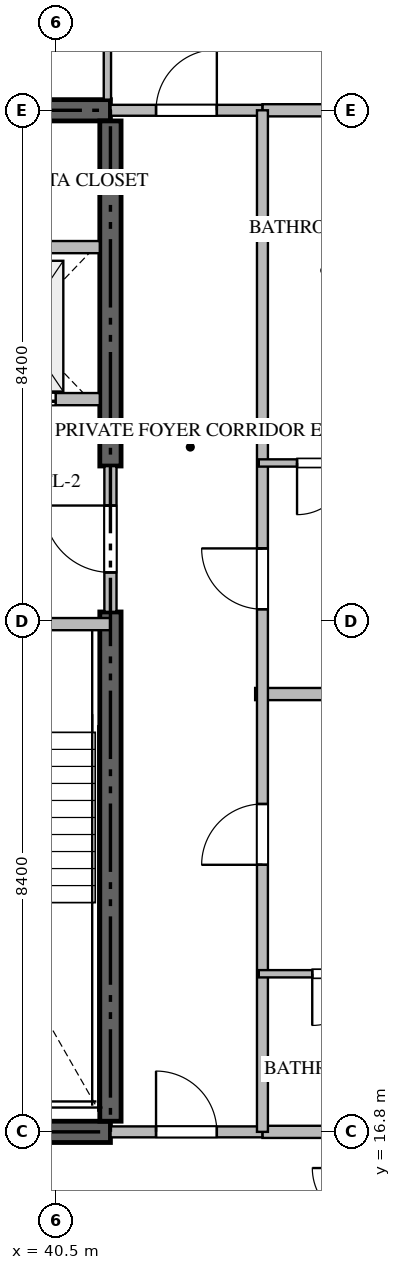
"""IFC4 building model, lengths in metres.
Left out: names, types, materials, properties, quantities, classifications, styles, units other than length and angle.
Written with IfcOpenShell. Run it as: python <this file> out.ifc"""

import sys

from ifc_helpers import new_model, si_unit, direction, frame, frame_2d, origin, place, context, subcontext, project, spatial, rectangle, extrude, source, transform, mapped, element, fill, save


model = new_model("IFC4")
c1 = context("Model", 3, precision=1e-05, world=origin(), true_north=direction((0.0, 1.0)))
c2 = subcontext(c1, "Body", "Model", "MODEL_VIEW")
j1 = project(units=[si_unit("LENGTHUNIT", "METRE"), si_unit("PLANEANGLEUNIT", "RADIAN")], contexts=[c1])
p1 = place(None, origin())
s1 = spatial("IfcSite", under=j1, at=p1, CompositionType="ELEMENT")
p2 = place(p1, origin())
s2 = spatial("IfcBuilding", under=s1, at=p2, CompositionType="ELEMENT")
p3 = place(p2, frame((0.0, 0.0, 229.7)))
s3 = spatial("IfcBuildingStorey", under=s2, at=p3, CompositionType="ELEMENT", Elevation=229.7)
for number, where, z_axis, x_axis in (
    (1, (23.4, 16.8, -0.26), (0.0, 0.0, 1.0), (1.0, 0.0, 0.0)),
    (2, (41.4, 33.6, -0.26), (0.0, 0.0, 1.0), (-1.0, 0.0, 0.0)),
):
    element("IfcWall", number, at=place(p3, frame(where, z_axis=z_axis, x_axis=x_axis)), inside=s3, PredefinedType="SHEAR", context=c2, shape_type="SweptSolid", body=[
        extrude(rectangle(XDim=18.0, YDim=0.35, at=frame_2d((9.0, 0.0))), origin(), (0.0, 0.0, 1.0), 3.848),
    ])
p4 = place(p3, frame((41.4, 16.975, -0.26), z_axis=(0.0, 0.0, 1.0), x_axis=(0.0, 1.0, 0.0)))
e3 = element("IfcWall", 3, at=p4, inside=s3, PredefinedType="SHEAR", context=c2, shape_type="SweptSolid", body=[
    extrude(rectangle(XDim=8.375, YDim=0.35, at=frame_2d((4.188, 0.0))), origin(), (0.0, 0.0, 1.0), 3.848),
])
p5 = place(p3, frame((41.4, 27.75, -0.26), z_axis=(0.0, 0.0, 1.0), x_axis=(0.0, 1.0, 0.0)))
e4 = element("IfcWall", 4, at=p5, inside=s3, PredefinedType="SHEAR", context=c2, shape_type="SweptSolid", body=[
    extrude(rectangle(XDim=5.675, YDim=0.35, at=frame_2d((2.837, 0.0))), origin(), (0.0, 0.0, 1.0), 3.848),
])
p6 = place(p3, frame((36.95, 25.15, 0.0), z_axis=(0.0, 0.0, 1.0), x_axis=(1.0, 0.0, 0.0)))
e5 = element("IfcWall", 5, at=p6, inside=s3, PredefinedType="STANDARD", context=c2, shape_type="SweptSolid", body=[
    extrude(rectangle(XDim=4.45, YDim=0.2, at=frame_2d((2.225, 0.0))), origin(), (0.0, 0.0, 1.0), 3.59),
])
p7 = place(p6, frame((1.65, 0.0, 0.0)))
e6 = element("IfcOpeningElement", 6, at=p7, cuts=e5, PredefinedType="OPENING", context=c2, shape_type="SweptSolid", body=[
    extrude(rectangle(XDim=1.1, YDim=2.15, at=frame_2d((0.55, 1.075))), frame((0.0, 0.11, 0.0), z_axis=(0.0, -1.0, 0.0), x_axis=(1.0, 0.0, 0.0)), (0.0, 0.0, 1.0), 0.22),
])
p8 = place(p3, frame((38.75, 28.85, 0.0), z_axis=(0.0, 0.0, 1.0), x_axis=(1.0, 0.0, 0.0)))
e7 = element("IfcWall", 7, at=p8, inside=s3, PredefinedType="STANDARD", context=c2, shape_type="SweptSolid", body=[
    extrude(rectangle(XDim=2.475, YDim=0.2, at=frame_2d((1.238, 0.0))), origin(), (0.0, 0.0, 1.0), 3.59),
])
p9 = place(p8, frame((0.55, 0.0, 0.0)))
e8 = element("IfcOpeningElement", 8, at=p9, cuts=e7, PredefinedType="OPENING", context=c2, shape_type="SweptSolid", body=[
    extrude(rectangle(XDim=1.2, YDim=2.2, at=frame_2d((0.6, 1.1))), frame((0.0, 0.11, 0.0), z_axis=(0.0, -1.0, 0.0), x_axis=(1.0, 0.0, 0.0)), (0.0, 0.0, 1.0), 0.22),
])
p10 = place(p3, frame((38.75, 31.35, 0.0), z_axis=(0.0, 0.0, 1.0), x_axis=(1.0, 0.0, 0.0)))
e9 = element("IfcWall", 9, at=p10, inside=s3, PredefinedType="STANDARD", context=c2, shape_type="SweptSolid", body=[
    extrude(rectangle(XDim=2.475, YDim=0.2, at=frame_2d((1.238, 0.0))), origin(), (0.0, 0.0, 1.0), 3.59),
])
p11 = place(p3, frame((41.4, 25.352, 0.0), z_axis=(0.0, 0.0, 1.0), x_axis=(0.0, 1.0, 0.0)))
e10 = element("IfcWall", 10, at=p11, inside=s3, PredefinedType="STANDARD", context=c2, shape_type="SweptSolid", body=[
    extrude(rectangle(XDim=2.396, YDim=0.2, at=frame_2d((1.198, 0.0))), origin(), (0.0, 0.0, 1.0), 3.59),
])
p12 = place(p11, frame((0.648, 0.0, 0.0)))
e11 = element("IfcOpeningElement", 11, at=p12, cuts=e10, PredefinedType="OPENING", context=c2, shape_type="SweptSolid", body=[
    extrude(rectangle(XDim=1.1, YDim=2.15, at=frame_2d((0.55, 1.075))), frame((0.0, 0.11, 0.0), z_axis=(0.0, -1.0, 0.0), x_axis=(1.0, 0.0, 0.0)), (0.0, 0.0, 1.0), 0.22),
])
p13 = place(p3, frame((43.78, 24.0, 0.0), z_axis=(0.0, 0.0, 1.0), x_axis=(1.0, 0.0, 0.0)))
e12 = element("IfcWall", 12, at=p13, inside=s3, PredefinedType="PARTITIONING", context=c2, shape_type="SweptSolid", body=[
    extrude(rectangle(XDim=13.538, YDim=0.2, at=frame_2d((6.769, 0.0))), origin(), (0.0, 0.0, 1.0), 3.59),
])
for number, where, z_axis, x_axis in (
    (13, (43.9, 16.8, 0.0), (0.0, 0.0, 1.0), (1.0, 0.0, 0.0)),
    (14, (43.9, 33.6, 0.0), (0.0, 0.0, 1.0), (1.0, 0.0, 0.0)),
):
    element("IfcWall", number, at=place(p3, frame(where, z_axis=z_axis, x_axis=x_axis)), inside=s3, PredefinedType="PARTITIONING", context=c2, shape_type="SweptSolid", body=[
        extrude(rectangle(XDim=13.418, YDim=0.2, at=frame_2d((6.709, 0.0))), origin(), (0.0, 0.0, 1.0), 3.59),
    ])
p14 = place(p3, frame((41.402, 16.8, 0.0), z_axis=(0.0, 0.0, 1.0), x_axis=(1.0, 0.0, 0.0)))
e15 = element("IfcWall", 15, at=p14, inside=s3, PredefinedType="PARTITIONING", context=c2, shape_type="SweptSolid", body=[
    extrude(rectangle(XDim=2.496, YDim=0.18, at=frame_2d((1.248, 0.0))), origin(), (0.0, 0.0, 1.0), 3.59),
])
p15 = place(p14, frame((0.748, 0.0, 0.0)))
e16 = element("IfcOpeningElement", 16, at=p15, cuts=e15, PredefinedType="OPENING", context=c2, shape_type="SweptSolid", body=[
    extrude(rectangle(XDim=1.0, YDim=2.15, at=frame_2d((0.5, 1.075))), frame((0.0, 0.1, 0.0), z_axis=(0.0, -1.0, 0.0), x_axis=(1.0, 0.0, 0.0)), (0.0, 0.0, 1.0), 0.2),
])
p16 = place(p3, frame((41.402, 33.6, 0.0), z_axis=(0.0, 0.0, 1.0), x_axis=(1.0, 0.0, 0.0)))
e17 = element("IfcWall", 17, at=p16, inside=s3, PredefinedType="PARTITIONING", context=c2, shape_type="SweptSolid", body=[
    extrude(rectangle(XDim=2.496, YDim=0.18, at=frame_2d((1.248, 0.0))), origin(), (0.0, 0.0, 1.0), 3.59),
])
p17 = place(p16, frame((0.748, 0.0, 0.0)))
e18 = element("IfcOpeningElement", 18, at=p17, cuts=e17, PredefinedType="OPENING", context=c2, shape_type="SweptSolid", body=[
    extrude(rectangle(XDim=1.0, YDim=2.15, at=frame_2d((0.5, 1.075))), frame((0.0, 0.1, 0.0), z_axis=(0.0, -1.0, 0.0), x_axis=(1.0, 0.0, 0.0)), (0.0, 0.0, 1.0), 0.2),
])
p18 = place(p3, frame((43.9, 16.8, 0.0), z_axis=(0.0, 0.0, 1.0), x_axis=(0.0, 1.0, 0.0)))
e19 = element("IfcWall", 19, at=p18, inside=s3, PredefinedType="PARTITIONING", context=c2, shape_type="SweptSolid", body=[
    extrude(rectangle(XDim=16.8, YDim=0.18, at=frame_2d((8.4, 0.0))), origin(), (0.0, 0.0, 1.0), 3.59),
])
p19 = place(p18, frame((4.392, 0.0, 0.0)))
e20 = element("IfcOpeningElement", 20, at=p19, cuts=e19, PredefinedType="OPENING", context=c2, shape_type="SweptSolid", body=[
    extrude(rectangle(XDim=1.0, YDim=2.15, at=frame_2d((0.5, 1.075))), frame((0.0, 0.1, 0.0), z_axis=(0.0, -1.0, 0.0), x_axis=(1.0, 0.0, 0.0)), (0.0, 0.0, 1.0), 0.2),
])
p20 = place(p18, frame((8.595, 0.0, 0.0)))
e21 = element("IfcOpeningElement", 21, at=p20, cuts=e19, PredefinedType="OPENING", context=c2, shape_type="SweptSolid", body=[
    extrude(rectangle(XDim=1.0, YDim=2.15, at=frame_2d((0.5, 1.075))), frame((0.0, 0.1, 0.0), z_axis=(0.0, -1.0, 0.0), x_axis=(1.0, 0.0, 0.0)), (0.0, 0.0, 1.0), 0.2),
])
p21 = place(p3, frame((41.35, 36.35, 0.0), z_axis=(0.0, 0.0, 1.0), x_axis=(0.0, -1.0, 0.0)))
e22 = element("IfcWall", 22, at=p21, inside=s3, PredefinedType="PARTITIONING", context=c2, shape_type="SweptSolid", body=[
    extrude(rectangle(XDim=2.575, YDim=0.12, at=frame_2d((1.288, 0.0))), origin(), (0.0, 0.0, 1.0), 3.59),
])
p22 = place(p3, frame((46.448, 19.4, 0.0), z_axis=(0.0, 0.0, 1.0), x_axis=(-1.0, 0.0, 0.0)))
e23 = element("IfcWall", 23, at=p22, inside=s3, PredefinedType="PARTITIONING", context=c2, shape_type="SweptSolid", body=[
    extrude(rectangle(XDim=2.608, YDim=0.12, at=frame_2d((1.304, 0.0))), origin(), (0.0, 0.0, 1.0), 3.59),
])
p23 = place(p22, frame((0.879, 0.0, 0.0)))
e24 = element("IfcOpeningElement", 24, at=p23, cuts=e23, PredefinedType="OPENING", context=c2, shape_type="SweptSolid", body=[
    extrude(rectangle(XDim=0.85, YDim=2.1, at=frame_2d((0.425, 1.05))), frame((0.0, 0.07, 0.0), z_axis=(0.0, -1.0, 0.0), x_axis=(1.0, 0.0, 0.0)), (0.0, 0.0, 1.0), 0.14),
])
p24 = place(p3, frame((45.948, 27.8, 0.0), z_axis=(0.0, 0.0, 1.0), x_axis=(-1.0, 0.0, 0.0)))
e25 = element("IfcWall", 25, at=p24, inside=s3, PredefinedType="PARTITIONING", context=c2, shape_type="SweptSolid", body=[
    extrude(rectangle(XDim=2.108, YDim=0.12, at=frame_2d((1.054, 0.0))), origin(), (0.0, 0.0, 1.0), 3.59),
])
p25 = place(p24, frame((0.629, 0.0, 0.0)))
e26 = element("IfcOpeningElement", 26, at=p25, cuts=e25, PredefinedType="OPENING", context=c2, shape_type="SweptSolid", body=[
    extrude(rectangle(XDim=0.85, YDim=2.1, at=frame_2d((0.425, 1.05))), frame((0.0, 0.07, 0.0), z_axis=(0.0, -1.0, 0.0), x_axis=(1.0, 0.0, 0.0)), (0.0, 0.0, 1.0), 0.14),
])
m1 = source(origin(), c2, "Body", "SweptSolid", [
    extrude(rectangle(XDim=1.2, YDim=2.2, at=frame_2d((0.6, 1.1))), frame((0.0, 0.025, 0.0), z_axis=(0.0, -1.0, 0.0), x_axis=(1.0, 0.0, 0.0)), (0.0, 0.0, 1.0), 0.05),
])
p26 = place(p9, origin())
e27 = element("IfcDoor", 27, at=p26, inside=s3, OperationType="DOUBLE_DOOR_SLIDING", PredefinedType="DOOR", context=c2, shape_type="MappedRepresentation", body=[
    mapped(m1, transform((0.0, 0.0, 0.0), scale=1.0)),
])
fill(e8, e27)
m2 = source(origin(), c2, "Body", "SweptSolid", [
    extrude(rectangle(XDim=1.1, YDim=2.15, at=frame_2d((0.55, 1.075))), frame((0.0, 0.025, 0.0), z_axis=(0.0, -1.0, 0.0), x_axis=(1.0, 0.0, 0.0)), (0.0, 0.0, 1.0), 0.05),
])
p27 = place(p12, origin())
e28 = element("IfcDoor", 28, at=p27, inside=s3, OperationType="SINGLE_SWING_RIGHT", PredefinedType="DOOR", context=c2, shape_type="MappedRepresentation", body=[
    mapped(m2, transform((0.0, 0.0, 0.0), scale=1.0)),
])
fill(e11, e28)
m3 = source(origin(), c2, "Body", "SweptSolid", [
    extrude(rectangle(XDim=1.0, YDim=2.15, at=frame_2d((0.5, 1.075))), frame((0.0, 0.025, 0.0), z_axis=(0.0, -1.0, 0.0), x_axis=(1.0, 0.0, 0.0)), (0.0, 0.0, 1.0), 0.05),
])
p28 = place(p15, origin())
e29 = element("IfcDoor", 29, at=p28, inside=s3, OperationType="SINGLE_SWING_LEFT", PredefinedType="DOOR", context=c2, shape_type="MappedRepresentation", body=[
    mapped(m3, transform((0.0, 0.0, 0.0), scale=1.0)),
])
fill(e16, e29)
p29 = place(p17, origin())
e30 = element("IfcDoor", 30, at=p29, inside=s3, OperationType="SINGLE_SWING_RIGHT", PredefinedType="DOOR", context=c2, shape_type="MappedRepresentation", body=[
    mapped(m3, transform((0.0, 0.0, 0.0), scale=1.0)),
])
fill(e18, e30)
p30 = place(p19, origin())
e31 = element("IfcDoor", 31, at=p30, inside=s3, OperationType="SINGLE_SWING_LEFT", PredefinedType="DOOR", context=c2, shape_type="MappedRepresentation", body=[
    mapped(m3, transform((0.0, 0.0, 0.0), scale=1.0)),
])
fill(e20, e31)
p31 = place(p20, origin())
e32 = element("IfcDoor", 32, at=p31, inside=s3, OperationType="SINGLE_SWING_RIGHT", PredefinedType="DOOR", context=c2, shape_type="MappedRepresentation", body=[
    mapped(m3, transform((0.0, 0.0, 0.0), scale=1.0)),
])
fill(e21, e32)
m4 = source(origin(), c2, "Body", "SweptSolid", [
    extrude(rectangle(XDim=0.85, YDim=2.1, at=frame_2d((0.425, 1.05))), frame((0.0, 0.025, 0.0), z_axis=(0.0, -1.0, 0.0), x_axis=(1.0, 0.0, 0.0)), (0.0, 0.0, 1.0), 0.05),
])
p32 = place(p23, origin())
e33 = element("IfcDoor", 33, at=p32, inside=s3, OperationType="SINGLE_SWING_RIGHT", PredefinedType="DOOR", context=c2, shape_type="MappedRepresentation", body=[
    mapped(m4, transform((0.0, 0.0, 0.0), scale=1.0)),
])
fill(e24, e33)
p33 = place(p25, origin())
e34 = element("IfcDoor", 34, at=p33, inside=s3, OperationType="SINGLE_SWING_RIGHT", PredefinedType="DOOR", context=c2, shape_type="MappedRepresentation", body=[
    mapped(m4, transform((0.0, 0.0, 0.0), scale=1.0)),
])
fill(e26, e34)
save(model, sys.argv[1])
